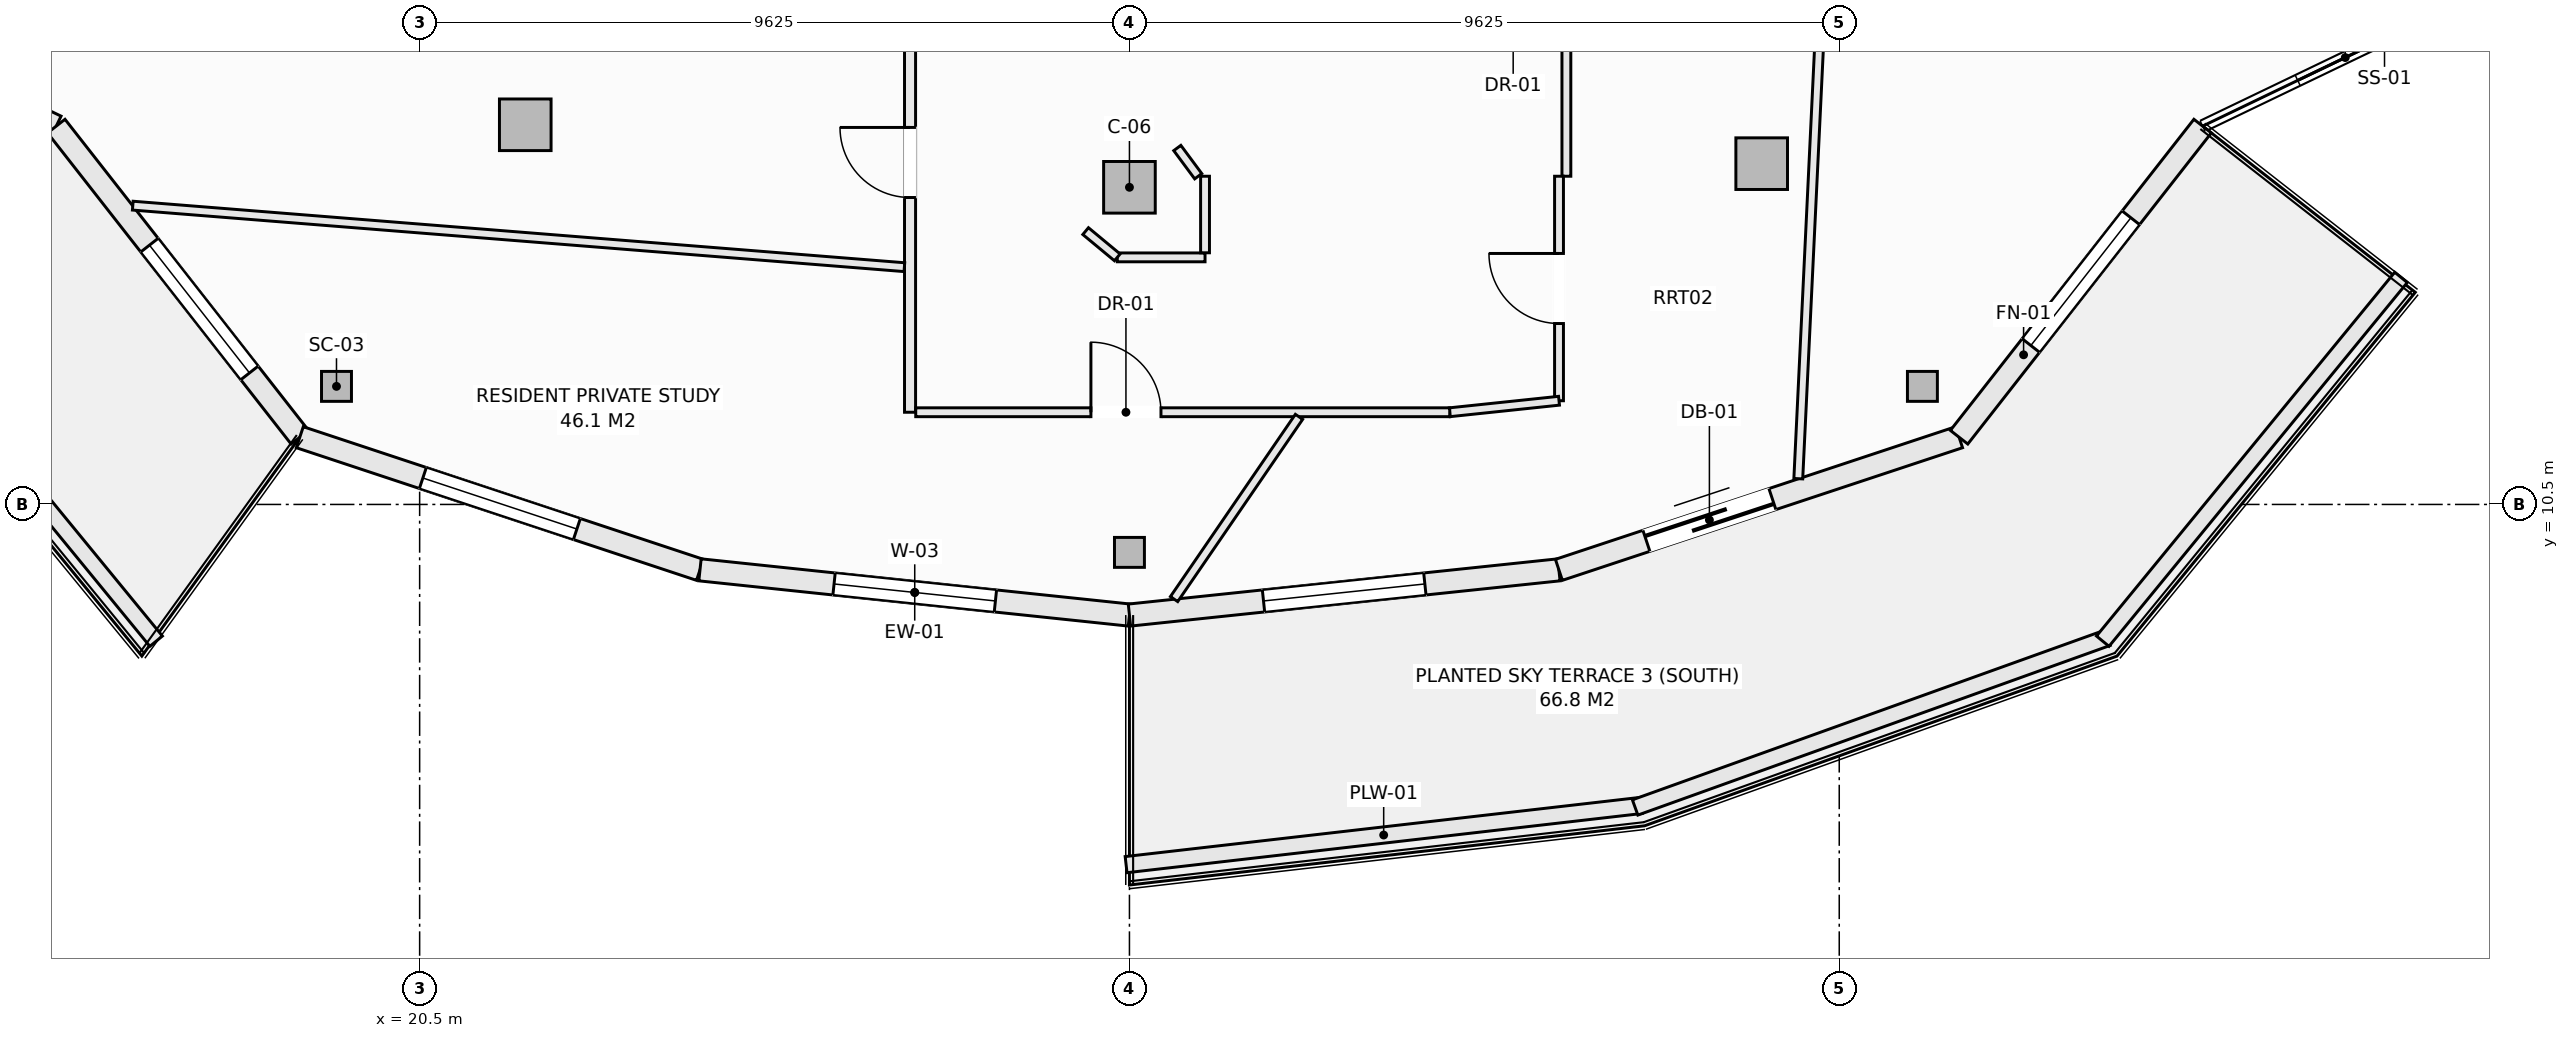
"""IFC4 building model, lengths in metres.
Left out: names, types, materials, properties, quantities, classifications, styles, units other than length and angle.
Written with IfcOpenShell. Run it as: python <this file> out.ifc"""

import sys

from ifc_helpers import new_model, si_unit, direction, frame, frame_2d, origin, origin_2d, place, context, subcontext, project, spatial, rectangle, hollow_rectangle, extrude, element, fill, save


model = new_model("IFC4")
c1 = context("Model", 3, precision=1e-05, world=origin(), true_north=direction((0.0, 1.0)))
c2 = subcontext(c1, "Body", "Model", "MODEL_VIEW")
j1 = project(units=[si_unit("LENGTHUNIT", "METRE"), si_unit("PLANEANGLEUNIT", "RADIAN")], contexts=[c1])
p1 = place(None, origin())
s1 = spatial("IfcSite", under=j1, at=p1, CompositionType="ELEMENT")
p2 = place(p1, origin())
s2 = spatial("IfcBuilding", under=s1, at=p2, CompositionType="ELEMENT")
p3 = place(p2, frame((0.0, 0.0, 239.3)))
s3 = spatial("IfcBuildingStorey", under=s2, at=p3, CompositionType="ELEMENT", Elevation=239.3)
for number, where, z_axis, x_axis in (
    (1, (19.372, 12.101, -0.27), (0.0, 0.0, 1.0), (1.0, 0.0, 0.0)),
    (2, (30.125, 9.85, -0.27), (0.0, 0.0, 1.0), (1.0, 0.0, 0.0)),
    (3, (40.878, 12.101, -0.27), (0.0, 0.0, 1.0), (1.0, 0.0, 0.0)),
):
    element("IfcColumn", number, at=place(p3, frame(where, z_axis=z_axis, x_axis=x_axis)), inside=s3, PredefinedType="COLUMN", context=c2, shape_type="SweptSolid", body=[
        extrude(hollow_rectangle(XDim=0.406, YDim=0.406, WallThickness=0.016, at=origin_2d()), origin(), (0.0, 0.0, 1.0), 3.3),
    ])
for number, where, z_axis, x_axis in (
    (4, (21.932, 15.648, -0.27), (0.0, 0.0, 1.0), (1.0, 0.0, 0.0)),
    (5, (30.125, 14.8, -0.27), (0.0, 0.0, 1.0), (1.0, 0.0, 0.0)),
    (6, (38.698, 15.121, -0.27), (0.0, 0.0, 1.0), (1.0, 0.0, 0.0)),
):
    element("IfcColumn", number, at=place(p3, frame(where, z_axis=z_axis, x_axis=x_axis)), inside=s3, PredefinedType="COLUMN", context=c2, shape_type="SweptSolid", body=[
        extrude(rectangle(XDim=0.7, YDim=0.7, at=origin_2d()), origin(), (0.0, 0.0, 1.0), 3.3),
    ])
p4 = place(p3, frame((10.639, 18.0, 0.0), z_axis=(0.0, 0.0, 1.0), x_axis=(0.901355238351, -0.433080517106, 0.0)))
e7 = element("IfcWall", 7, at=p4, inside=s3, PredefinedType="SOLIDWALL", context=c2, shape_type="SweptSolid", body=[
    extrude(rectangle(XDim=5.473, YDim=0.3, at=frame_2d((2.737, 0.0))), origin(), (0.0, 0.0, 1.0), 2.605),
])
p5 = place(p4, frame((1.837, 0.0, 0.0)))
e8 = element("IfcOpeningElement", 8, at=p5, cuts=e7, PredefinedType="OPENING", context=c2, shape_type="SweptSolid", body=[
    extrude(rectangle(XDim=1.8, YDim=2.25, at=frame_2d((0.9, 1.125))), frame((0.0, 0.16, 0.0), z_axis=(0.0, -1.0, 0.0), x_axis=(1.0, 0.0, 0.0)), (0.0, 0.0, 1.0), 0.32),
])
p6 = place(p3, frame((15.573, 15.63, 0.0), z_axis=(0.0, 0.0, 1.0), x_axis=(0.61644588519, -0.787397276241, 0.0)))
e9 = element("IfcWall", 9, at=p6, inside=s3, PredefinedType="SOLIDWALL", context=c2, shape_type="SweptSolid", body=[
    extrude(rectangle(XDim=5.357, YDim=0.3, at=frame_2d((2.678, 0.0))), origin(), (0.0, 0.0, 1.0), 2.605),
])
p7 = place(p6, frame((2.05, 0.0, 0.72)))
e10 = element("IfcOpeningElement", 10, at=p7, cuts=e9, PredefinedType="OPENING", context=c2, shape_type="SweptSolid", body=[
    extrude(rectangle(XDim=2.2, YDim=1.65, at=frame_2d((1.1, 0.825))), frame((0.0, 0.16, 0.0), z_axis=(0.0, -1.0, 0.0), x_axis=(1.0, 0.0, 0.0)), (0.0, 0.0, 1.0), 0.32),
])
p8 = place(p3, frame((18.875, 11.412, 0.0), z_axis=(0.0, 0.0, 1.0), x_axis=(0.949232769585, -0.314574552605, 0.0)))
e11 = element("IfcWall", 11, at=p8, inside=s3, PredefinedType="SOLIDWALL", context=c2, shape_type="SweptSolid", body=[
    extrude(rectangle(XDim=5.717, YDim=0.3, at=frame_2d((2.858, 0.0))), origin(), (0.0, 0.0, 1.0), 2.605),
])
p9 = place(p8, frame((1.758, 0.0, 0.72)))
e12 = element("IfcOpeningElement", 12, at=p9, cuts=e11, PredefinedType="OPENING", context=c2, shape_type="SweptSolid", body=[
    extrude(rectangle(XDim=2.2, YDim=1.65, at=frame_2d((1.1, 0.825))), frame((0.0, 0.16, 0.0), z_axis=(0.0, -1.0, 0.0), x_axis=(1.0, 0.0, 0.0)), (0.0, 0.0, 1.0), 0.32),
])
p10 = place(p3, frame((24.302, 9.613, 0.0), z_axis=(0.0, 0.0, 1.0), x_axis=(0.994500425783, -0.10473253132, 0.0)))
e13 = element("IfcWall", 13, at=p10, inside=s3, PredefinedType="SOLIDWALL", context=c2, shape_type="SweptSolid", body=[
    extrude(rectangle(XDim=5.856, YDim=0.3, at=frame_2d((2.928, 0.0))), origin(), (0.0, 0.0, 1.0), 2.605),
])
p11 = place(p10, frame((1.828, 0.0, 0.72)))
e14 = element("IfcOpeningElement", 14, at=p11, cuts=e13, PredefinedType="OPENING", context=c2, shape_type="SweptSolid", body=[
    extrude(rectangle(XDim=2.2, YDim=1.65, at=frame_2d((1.1, 0.825))), frame((0.0, 0.16, 0.0), z_axis=(0.0, -1.0, 0.0), x_axis=(1.0, 0.0, 0.0)), (0.0, 0.0, 1.0), 0.32),
])
p12 = place(p3, frame((30.125, 9.0, 0.0), z_axis=(0.0, 0.0, 1.0), x_axis=(0.994500425783, 0.10473253132, 0.0)))
e15 = element("IfcWall", 15, at=p12, inside=s3, PredefinedType="SOLIDWALL", context=c2, shape_type="SweptSolid", body=[
    extrude(rectangle(XDim=5.856, YDim=0.3, at=frame_2d((2.928, 0.0))), origin(), (0.0, 0.0, 1.0), 2.605),
])
p13 = place(p12, frame((1.828, 0.0, 0.72)))
e16 = element("IfcOpeningElement", 16, at=p13, cuts=e15, PredefinedType="OPENING", context=c2, shape_type="SweptSolid", body=[
    extrude(rectangle(XDim=2.2, YDim=1.65, at=frame_2d((1.1, 0.825))), frame((0.0, 0.16, 0.0), z_axis=(0.0, -1.0, 0.0), x_axis=(1.0, 0.0, 0.0)), (0.0, 0.0, 1.0), 0.32),
])
p14 = place(p3, frame((35.948, 9.613, 0.0), z_axis=(0.0, 0.0, 1.0), x_axis=(0.949232769585, 0.314574552605, 0.0)))
e17 = element("IfcWall", 17, at=p14, inside=s3, PredefinedType="SOLIDWALL", context=c2, shape_type="SweptSolid", body=[
    extrude(rectangle(XDim=5.717, YDim=0.3, at=frame_2d((2.858, 0.0))), origin(), (0.0, 0.0, 1.0), 2.605),
])
p15 = place(p14, frame((1.25, 0.0, 0.0)))
e18 = element("IfcOpeningElement", 18, at=p15, cuts=e17, PredefinedType="OPENING", context=c2, shape_type="SweptSolid", body=[
    extrude(rectangle(XDim=1.8, YDim=2.25, at=frame_2d((0.9, 1.125))), frame((0.0, 0.16, 0.0), z_axis=(0.0, -1.0, 0.0), x_axis=(1.0, 0.0, 0.0)), (0.0, 0.0, 1.0), 0.32),
])
p16 = place(p3, frame((41.375, 11.412, 0.0), z_axis=(0.0, 0.0, 1.0), x_axis=(0.61644588519, 0.787397276241, 0.0)))
e19 = element("IfcWall", 19, at=p16, inside=s3, PredefinedType="SOLIDWALL", context=c2, shape_type="SweptSolid", body=[
    extrude(rectangle(XDim=5.357, YDim=0.3, at=frame_2d((2.678, 0.0))), origin(), (0.0, 0.0, 1.0), 2.605),
])
p17 = place(p16, frame((1.579, 0.0, 0.72)))
e20 = element("IfcOpeningElement", 20, at=p17, cuts=e19, PredefinedType="OPENING", context=c2, shape_type="SweptSolid", body=[
    extrude(rectangle(XDim=2.2, YDim=1.65, at=frame_2d((1.1, 0.825))), frame((0.0, 0.16, 0.0), z_axis=(0.0, -1.0, 0.0), x_axis=(1.0, 0.0, 0.0)), (0.0, 0.0, 1.0), 0.32),
])
p18 = place(p3, frame((12.882, 13.579, 0.0), z_axis=(0.0, 0.0, 1.0), x_axis=(0.63407318032, -0.77327304492, 0.0)))
e21 = element("IfcWall", 21, at=p18, inside=s3, PredefinedType="PARAPET", context=c2, shape_type="SweptSolid", body=[
    extrude(rectangle(XDim=6.379, YDim=0.22, at=frame_2d((3.189, 0.0))), origin(), (0.0, 0.0, 1.0), 0.52),
])
p19 = place(p3, frame((30.08, 5.616, 0.0), z_axis=(0.0, 0.0, 1.0), x_axis=(0.993458716016, 0.114191854231, 0.0)))
e22 = element("IfcWall", 22, at=p19, inside=s3, PredefinedType="PARAPET", context=c2, shape_type="SweptSolid", body=[
    extrude(rectangle(XDim=7.032, YDim=0.22, at=frame_2d((3.516, 0.0))), origin(), (0.0, 0.0, 1.0), 0.52),
])
p20 = place(p3, frame((36.982, 6.392, 0.0), z_axis=(0.0, 0.0, 1.0), x_axis=(0.941139090914, 0.338019543152, 0.0)))
e23 = element("IfcWall", 23, at=p20, inside=s3, PredefinedType="PARAPET", context=c2, shape_type="SweptSolid", body=[
    extrude(rectangle(XDim=6.807, YDim=0.22, at=frame_2d((3.403, 0.0))), origin(), (0.0, 0.0, 1.0), 0.52),
])
p21 = place(p3, frame((43.323, 8.646, 0.0), z_axis=(0.0, 0.0, 1.0), x_axis=(0.63407318032, 0.77327304492, 0.0)))
e24 = element("IfcWall", 24, at=p21, inside=s3, PredefinedType="PARAPET", context=c2, shape_type="SweptSolid", body=[
    extrude(rectangle(XDim=6.379, YDim=0.22, at=frame_2d((3.189, 0.0))), origin(), (0.0, 0.0, 1.0), 0.52),
])
p22 = place(p3, frame((27.15, 11.75, 0.0), z_axis=(0.0, 0.0, 1.0), x_axis=(0.0, 1.0, 0.0)))
e25 = element("IfcWall", 25, at=p22, inside=s3, PredefinedType="PARTITIONING", context=c2, shape_type="SweptSolid", body=[
    extrude(rectangle(XDim=5.223, YDim=0.15, at=frame_2d((2.611, 0.0))), origin(), (0.0, 0.0, 1.0), 3.03),
])
p23 = place(p22, frame((2.912, 0.0, 0.0)))
e26 = element("IfcOpeningElement", 26, at=p23, cuts=e25, PredefinedType="OPENING", context=c2, shape_type="SweptSolid", body=[
    extrude(rectangle(XDim=0.95, YDim=2.1, at=frame_2d((0.475, 1.05))), frame((0.0, 0.085, 0.0), z_axis=(0.0, -1.0, 0.0), x_axis=(1.0, 0.0, 0.0)), (0.0, 0.0, 1.0), 0.17),
])
p24 = place(p3, frame((36.05, 14.95, 0.0), z_axis=(0.0, 0.0, 1.0), x_axis=(0.0, 1.0, 0.0)))
e27 = element("IfcWall", 27, at=p24, inside=s3, PredefinedType="PARTITIONING", context=c2, shape_type="SweptSolid", body=[
    extrude(rectangle(XDim=2.593, YDim=0.12, at=frame_2d((1.296, 0.0))), origin(), (0.0, 0.0, 1.0), 3.03),
])
p25 = place(p3, frame((35.95, 11.906, 0.0), z_axis=(0.0, 0.0, 1.0), x_axis=(0.0, 1.0, 0.0)))
e28 = element("IfcWall", 28, at=p25, inside=s3, PredefinedType="PARTITIONING", context=c2, shape_type="SweptSolid", body=[
    extrude(rectangle(XDim=3.044, YDim=0.12, at=frame_2d((1.522, 0.0))), origin(), (0.0, 0.0, 1.0), 3.03),
])
p26 = place(p25, frame((1.047, 0.0, 0.0)))
e29 = element("IfcOpeningElement", 29, at=p26, cuts=e28, PredefinedType="OPENING", context=c2, shape_type="SweptSolid", body=[
    extrude(rectangle(XDim=0.95, YDim=2.1, at=frame_2d((0.475, 1.05))), frame((0.0, 0.07, 0.0), z_axis=(0.0, -1.0, 0.0), x_axis=(1.0, 0.0, 0.0)), (0.0, 0.0, 1.0), 0.14),
])
p27 = place(p3, frame((34.468, 11.75, 0.0), z_axis=(0.0, 0.0, 1.0), x_axis=(0.994504555135, 0.104693313135, 0.0)))
e30 = element("IfcWall", 30, at=p27, inside=s3, PredefinedType="PARTITIONING", context=c2, shape_type="SweptSolid", body=[
    extrude(rectangle(XDim=1.49, YDim=0.12, at=frame_2d((0.745, 0.0))), origin(), (0.0, 0.0, 1.0), 3.03),
])
p28 = place(p3, frame((27.227, 11.75, 0.0), z_axis=(0.0, 0.0, 1.0), x_axis=(1.0, 0.0, 0.0)))
e31 = element("IfcWall", 31, at=p28, inside=s3, PredefinedType="PARTITIONING", context=c2, shape_type="SweptSolid", body=[
    extrude(rectangle(XDim=7.241, YDim=0.12, at=frame_2d((3.621, 0.0))), origin(), (0.0, 0.0, 1.0), 3.03),
])
p29 = place(p28, frame((2.375, 0.0, 0.0)))
e32 = element("IfcOpeningElement", 32, at=p29, cuts=e31, PredefinedType="OPENING", context=c2, shape_type="SweptSolid", body=[
    extrude(rectangle(XDim=0.95, YDim=2.1, at=frame_2d((0.475, 1.05))), frame((0.0, 0.07, 0.0), z_axis=(0.0, -1.0, 0.0), x_axis=(1.0, 0.0, 0.0)), (0.0, 0.0, 1.0), 0.14),
])
p30 = place(p3, frame((29.96, 13.85, 0.0), z_axis=(0.0, 0.0, 1.0), x_axis=(1.0, 0.0, 0.0)))
e33 = element("IfcWall", 33, at=p30, inside=s3, PredefinedType="PARTITIONING", context=c2, shape_type="SweptSolid", body=[
    extrude(rectangle(XDim=1.19, YDim=0.12, at=frame_2d((0.595, 0.0))), origin(), (0.0, 0.0, 1.0), 3.03),
])
p31 = place(p3, frame((31.15, 13.912, 0.0), z_axis=(0.0, 0.0, 1.0), x_axis=(0.0, 1.0, 0.0)))
e34 = element("IfcWall", 34, at=p31, inside=s3, PredefinedType="PARTITIONING", context=c2, shape_type="SweptSolid", body=[
    extrude(rectangle(XDim=1.038, YDim=0.12, at=frame_2d((0.519, 0.0))), origin(), (0.0, 0.0, 1.0), 3.03),
])
p32 = place(p3, frame((30.774, 15.333, 0.0), z_axis=(0.0, 0.0, 1.0), x_axis=(0.595814974861, -0.803121731577, 0.0)))
e35 = element("IfcWall", 35, at=p32, inside=s3, PredefinedType="PARTITIONING", context=c2, shape_type="SweptSolid", body=[
    extrude(rectangle(XDim=0.477, YDim=0.12, at=frame_2d((0.239, 0.0))), origin(), (0.0, 0.0, 1.0), 3.03),
])
p33 = place(p3, frame((29.531, 14.206, 0.0), z_axis=(0.0, 0.0, 1.0), x_axis=(0.7695479554, -0.638589026166, 0.0)))
e36 = element("IfcWall", 36, at=p33, inside=s3, PredefinedType="PARTITIONING", context=c2, shape_type="SweptSolid", body=[
    extrude(rectangle(XDim=0.557, YDim=0.12, at=frame_2d((0.279, 0.0))), origin(), (0.0, 0.0, 1.0), 3.03),
])
p34 = place(p3, frame((16.61, 14.551, 0.0), z_axis=(0.0, 0.0, 1.0), x_axis=(0.996836469487, -0.079479891176, 0.0)))
e37 = element("IfcWall", 37, at=p34, inside=s3, PredefinedType="PARTITIONING", context=c2, shape_type="SweptSolid", body=[
    extrude(rectangle(XDim=10.496, YDim=0.12, at=frame_2d((5.248, 0.0))), origin(), (0.0, 0.0, 1.0), 3.03),
])
p35 = place(p3, frame((30.73, 9.217, 0.0), z_axis=(0.0, 0.0, 1.0), x_axis=(0.565501438977, 0.82474730828, 0.0)))
e38 = element("IfcWall", 38, at=p35, inside=s3, PredefinedType="PARTITIONING", context=c2, shape_type="SweptSolid", body=[
    extrude(rectangle(XDim=2.997, YDim=0.12, at=frame_2d((1.498, 0.0))), origin(), (0.0, 0.0, 1.0), 3.03),
])
p36 = place(p3, frame((39.195, 10.849, 0.0), z_axis=(0.0, 0.0, 1.0), x_axis=(0.048036414601, 0.998845585099, 0.0)))
e39 = element("IfcWall", 39, at=p36, inside=s3, PredefinedType="PARTITIONING", context=c2, shape_type="SweptSolid", body=[
    extrude(rectangle(XDim=7.359, YDim=0.12, at=frame_2d((3.68, 0.0))), origin(), (0.0, 0.0, 1.0), 2.478),
])
p37 = place(p7, origin())
e40 = element("IfcWindow", 40, at=p37, inside=s3, PartitioningType="SINGLE_PANEL", PredefinedType="WINDOW", context=c2, shape_type="SweptSolid", body=[
    extrude(rectangle(XDim=2.2, YDim=1.65, at=frame_2d((1.1, 0.825))), frame((0.0, 0.03, 0.0), z_axis=(0.0, -1.0, 0.0), x_axis=(1.0, 0.0, 0.0)), (0.0, 0.0, 1.0), 0.06),
])
fill(e10, e40)
p38 = place(p9, origin())
e41 = element("IfcWindow", 41, at=p38, inside=s3, PartitioningType="SINGLE_PANEL", PredefinedType="WINDOW", context=c2, shape_type="SweptSolid", body=[
    extrude(rectangle(XDim=2.2, YDim=1.65, at=frame_2d((1.1, 0.825))), frame((0.0, 0.03, 0.0), z_axis=(0.0, -1.0, 0.0), x_axis=(1.0, 0.0, 0.0)), (0.0, 0.0, 1.0), 0.06),
])
fill(e12, e41)
p39 = place(p11, origin())
e42 = element("IfcWindow", 42, at=p39, inside=s3, PartitioningType="SINGLE_PANEL", PredefinedType="WINDOW", context=c2, shape_type="SweptSolid", body=[
    extrude(rectangle(XDim=2.2, YDim=1.65, at=frame_2d((1.1, 0.825))), frame((0.0, 0.03, 0.0), z_axis=(0.0, -1.0, 0.0), x_axis=(1.0, 0.0, 0.0)), (0.0, 0.0, 1.0), 0.06),
])
fill(e14, e42)
p40 = place(p13, origin())
e43 = element("IfcWindow", 43, at=p40, inside=s3, PartitioningType="SINGLE_PANEL", PredefinedType="WINDOW", context=c2, shape_type="SweptSolid", body=[
    extrude(rectangle(XDim=2.2, YDim=1.65, at=frame_2d((1.1, 0.825))), frame((0.0, 0.03, 0.0), z_axis=(0.0, -1.0, 0.0), x_axis=(1.0, 0.0, 0.0)), (0.0, 0.0, 1.0), 0.06),
])
fill(e16, e43)
p41 = place(p15, frame((1.8, 0.0, 0.0), z_axis=(0.0, 0.0, 1.0), x_axis=(-1.0, 0.0, 0.0)))
e44 = element("IfcDoor", 44, at=p41, inside=s3, OperationType="SLIDING_TO_LEFT", PredefinedType="DOOR", context=c2, shape_type="SweptSolid", body=[
    extrude(rectangle(XDim=1.8, YDim=2.25, at=frame_2d((0.9, 1.125))), frame((0.0, 0.025, 0.0), z_axis=(0.0, -1.0, 0.0), x_axis=(1.0, 0.0, 0.0)), (0.0, 0.0, 1.0), 0.05),
])
fill(e18, e44)
p42 = place(p17, origin())
e45 = element("IfcWindow", 45, at=p42, inside=s3, PartitioningType="SINGLE_PANEL", PredefinedType="WINDOW", context=c2, shape_type="SweptSolid", body=[
    extrude(rectangle(XDim=2.2, YDim=1.65, at=frame_2d((1.1, 0.825))), frame((0.0, 0.03, 0.0), z_axis=(0.0, -1.0, 0.0), x_axis=(1.0, 0.0, 0.0)), (0.0, 0.0, 1.0), 0.06),
])
fill(e20, e45)
p43 = place(p29, origin())
e46 = element("IfcDoor", 46, at=p43, inside=s3, OperationType="SINGLE_SWING_LEFT", PredefinedType="DOOR", context=c2, shape_type="SweptSolid", body=[
    extrude(rectangle(XDim=0.95, YDim=2.1, at=frame_2d((0.475, 1.05))), frame((0.0, 0.025, 0.0), z_axis=(0.0, -1.0, 0.0), x_axis=(1.0, 0.0, 0.0)), (0.0, 0.0, 1.0), 0.05),
])
fill(e32, e46)
p44 = place(p26, origin())
e47 = element("IfcDoor", 47, at=p44, inside=s3, OperationType="SINGLE_SWING_RIGHT", PredefinedType="DOOR", context=c2, shape_type="SweptSolid", body=[
    extrude(rectangle(XDim=0.95, YDim=2.1, at=frame_2d((0.475, 1.05))), frame((0.0, 0.025, 0.0), z_axis=(0.0, -1.0, 0.0), x_axis=(1.0, 0.0, 0.0)), (0.0, 0.0, 1.0), 0.05),
])
fill(e29, e47)
p45 = place(p23, origin())
e48 = element("IfcDoor", 48, at=p45, inside=s3, OperationType="SINGLE_SWING_RIGHT", PredefinedType="DOOR", context=c2, shape_type="SweptSolid", body=[
    extrude(rectangle(XDim=0.95, YDim=2.1, at=frame_2d((0.475, 1.05))), frame((0.0, 0.025, 0.0), z_axis=(0.0, -1.0, 0.0), x_axis=(1.0, 0.0, 0.0)), (0.0, 0.0, 1.0), 0.05),
])
fill(e26, e48)
save(model, sys.argv[1])
